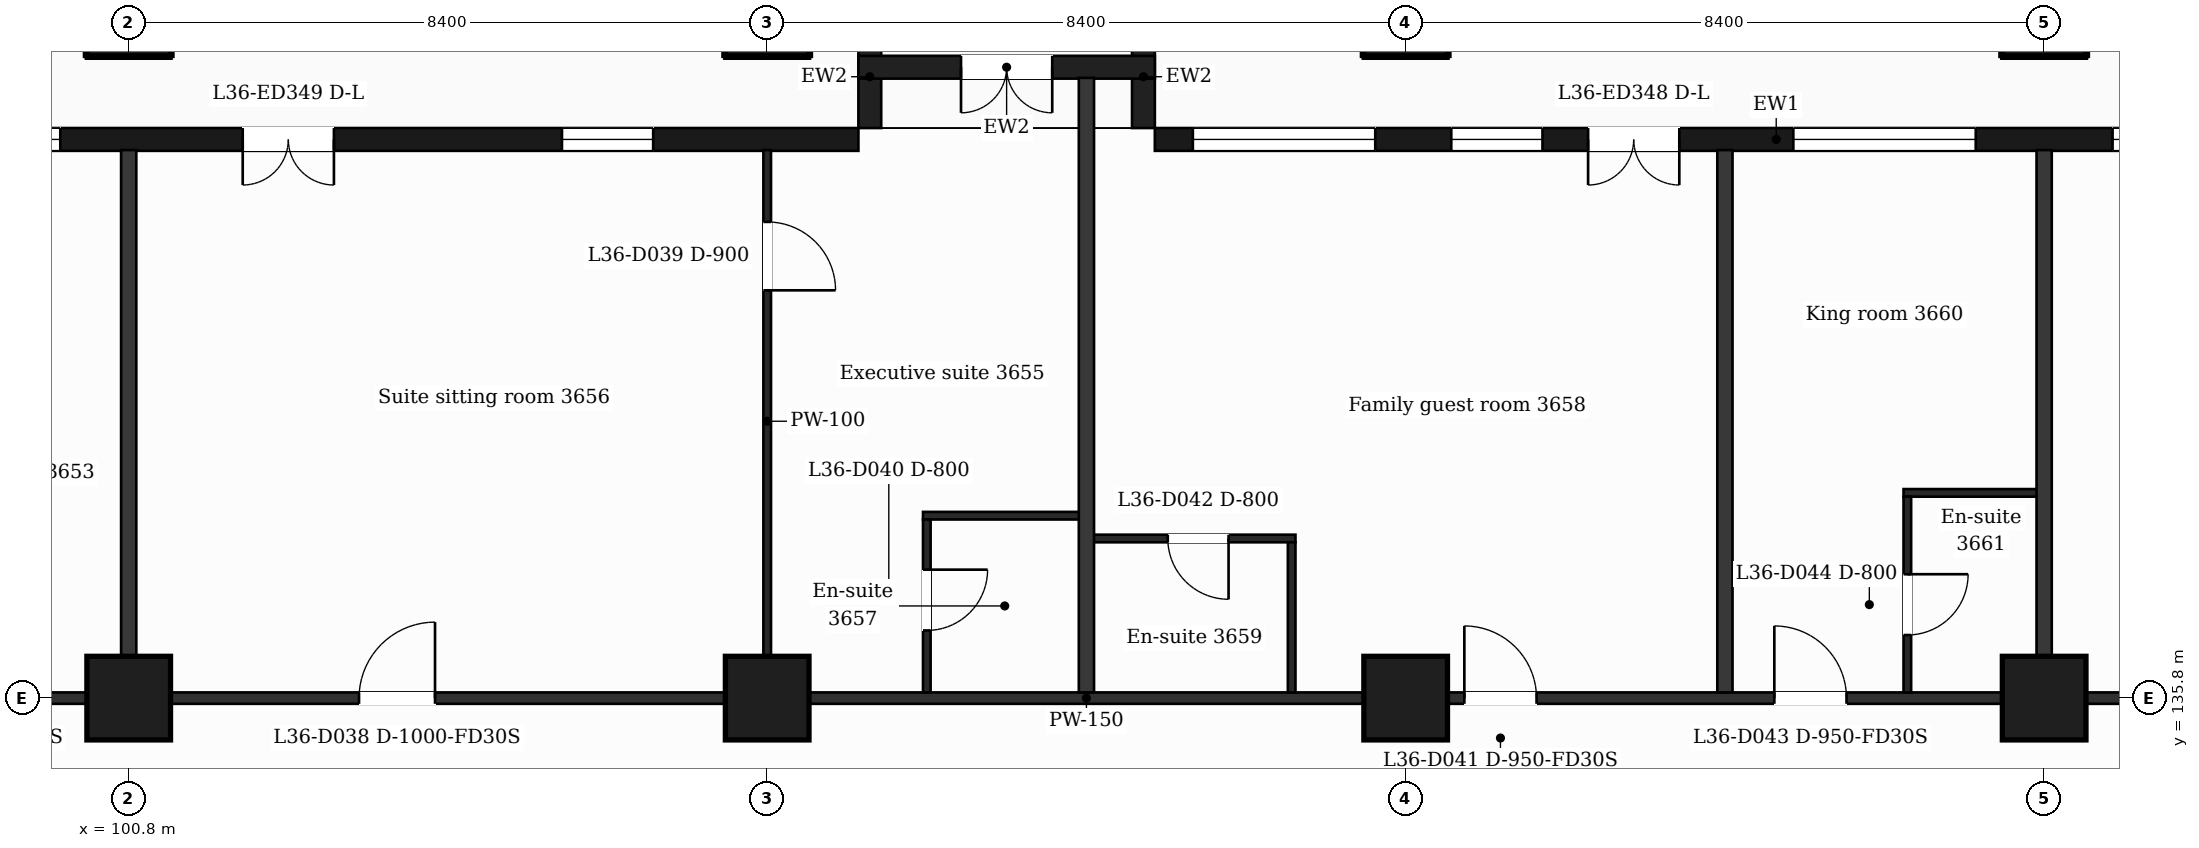
"""IFC4 building model, lengths in metres.
Left out: names, types, materials, properties, quantities, classifications, styles, units other than length and angle.
Written with IfcOpenShell. Run it as: python <this file> out.ifc"""

import sys

from ifc_helpers import new_model, si_unit, direction, frame, frame_2d, origin, origin_2d, place, context, subcontext, project, spatial, rectangle, extrude, element, fill, save


model = new_model("IFC4")
c1 = context("Model", 3, precision=1e-05, world=origin(), true_north=direction((0.0, 1.0)))
c2 = subcontext(c1, "Body", "Model", "MODEL_VIEW")
j1 = project(units=[si_unit("LENGTHUNIT", "METRE"), si_unit("PLANEANGLEUNIT", "RADIAN")], contexts=[c1])
p1 = place(None, origin())
s1 = spatial("IfcSite", under=j1, at=p1, CompositionType="ELEMENT")
p2 = place(p1, origin())
s2 = spatial("IfcBuilding", under=s1, at=p2, CompositionType="ELEMENT")
p3 = place(p2, frame((0.0, 0.0, 155.2)))
s3 = spatial("IfcBuildingStorey", under=s2, at=p3, CompositionType="ELEMENT", Elevation=155.2)
for number, where, z_axis, x_axis in (
    (1, (100.8, 135.8, 0.0), (0.0, 0.0, 1.0), (1.0, 0.0, 0.0)),
    (2, (109.2, 135.8, 0.0), (0.0, 0.0, 1.0), (1.0, 0.0, 0.0)),
    (3, (117.6, 135.8, 0.0), (0.0, 0.0, 1.0), (1.0, 0.0, 0.0)),
    (4, (126.0, 135.8, 0.0), (0.0, 0.0, 1.0), (1.0, 0.0, 0.0)),
    (5, (100.8, 144.8, 0.0), (0.0, 0.0, 1.0), (1.0, 0.0, 0.0)),
    (6, (109.2, 144.8, 0.0), (0.0, 0.0, 1.0), (1.0, 0.0, 0.0)),
    (7, (117.6, 144.8, 0.0), (0.0, 0.0, 1.0), (1.0, 0.0, 0.0)),
    (8, (126.0, 144.8, 0.0), (0.0, 0.0, 1.0), (1.0, 0.0, 0.0)),
):
    element("IfcColumn", number, at=place(p3, frame(where, z_axis=z_axis, x_axis=x_axis)), inside=s3, PredefinedType="COLUMN", context=c2, shape_type="SweptSolid", body=[
        extrude(rectangle(XDim=1.1, YDim=1.1, at=origin_2d()), origin(), (0.0, 0.0, 1.0), 3.7),
    ])
p4 = place(p3, frame((130.65, 143.15, 0.0), z_axis=(0.0, 0.0, 1.0), x_axis=(-1.0, 0.0, 0.0)))
e9 = element("IfcWall", 9, at=p4, inside=s3, PredefinedType="SOLIDWALL", context=c2, shape_type="SweptSolid", body=[
    extrude(rectangle(XDim=16.35, YDim=0.3, at=frame_2d((8.175, 0.0))), origin(), (0.0, 0.0, 1.0), 3.38),
])
p5 = place(p4, frame((1.35, 0.0, 0.9)))
e10 = element("IfcOpeningElement", 10, at=p5, cuts=e9, PredefinedType="OPENING", context=c2, shape_type="SweptSolid", body=[
    extrude(rectangle(XDim=2.4, YDim=2.1, at=frame_2d((1.2, 1.05))), frame((0.0, 0.16, 0.0), z_axis=(0.0, -1.0, 0.0), x_axis=(1.0, 0.0, 0.0)), (0.0, 0.0, 1.0), 0.32),
])
p6 = place(p4, frame((5.55, 0.0, 0.9)))
e11 = element("IfcOpeningElement", 11, at=p6, cuts=e9, PredefinedType="OPENING", context=c2, shape_type="SweptSolid", body=[
    extrude(rectangle(XDim=2.4, YDim=2.1, at=frame_2d((1.2, 1.05))), frame((0.0, 0.16, 0.0), z_axis=(0.0, -1.0, 0.0), x_axis=(1.0, 0.0, 0.0)), (0.0, 0.0, 1.0), 0.32),
])
p7 = place(p4, frame((9.45, 0.0, 0.0)))
e12 = element("IfcOpeningElement", 12, at=p7, cuts=e9, PredefinedType="OPENING", context=c2, shape_type="SweptSolid", body=[
    extrude(rectangle(XDim=1.2, YDim=2.4, at=frame_2d((0.6, 1.2))), frame((0.0, 0.16, 0.0), z_axis=(0.0, -1.0, 0.0), x_axis=(1.0, 0.0, 0.0)), (0.0, 0.0, 1.0), 0.32),
])
p8 = place(p4, frame((11.25, 0.0, 0.9)))
e13 = element("IfcOpeningElement", 13, at=p8, cuts=e9, PredefinedType="OPENING", context=c2, shape_type="SweptSolid", body=[
    extrude(rectangle(XDim=1.2, YDim=2.1, at=frame_2d((0.6, 1.05))), frame((0.0, 0.16, 0.0), z_axis=(0.0, -1.0, 0.0), x_axis=(1.0, 0.0, 0.0)), (0.0, 0.0, 1.0), 0.32),
])
p9 = place(p4, frame((13.45, 0.0, 0.9)))
e14 = element("IfcOpeningElement", 14, at=p9, cuts=e9, PredefinedType="OPENING", context=c2, shape_type="SweptSolid", body=[
    extrude(rectangle(XDim=2.4, YDim=2.1, at=frame_2d((1.2, 1.05))), frame((0.0, 0.16, 0.0), z_axis=(0.0, -1.0, 0.0), x_axis=(1.0, 0.0, 0.0)), (0.0, 0.0, 1.0), 0.32),
])
p10 = place(p3, frame((110.4, 143.15, 0.0), z_axis=(0.0, 0.0, 1.0), x_axis=(-1.0, 0.0, 0.0)))
e15 = element("IfcWall", 15, at=p10, inside=s3, PredefinedType="SOLIDWALL", context=c2, shape_type="SweptSolid", body=[
    extrude(rectangle(XDim=14.4, YDim=0.3, at=frame_2d((7.2, 0.0))), origin(), (0.0, 0.0, 1.0), 3.38),
])
p11 = place(p10, frame((2.7, 0.0, 0.9)))
e16 = element("IfcOpeningElement", 16, at=p11, cuts=e15, PredefinedType="OPENING", context=c2, shape_type="SweptSolid", body=[
    extrude(rectangle(XDim=1.2, YDim=2.1, at=frame_2d((0.6, 1.05))), frame((0.0, 0.16, 0.0), z_axis=(0.0, -1.0, 0.0), x_axis=(1.0, 0.0, 0.0)), (0.0, 0.0, 1.0), 0.32),
])
p12 = place(p10, frame((6.9, 0.0, 0.0)))
e17 = element("IfcOpeningElement", 17, at=p12, cuts=e15, PredefinedType="OPENING", context=c2, shape_type="SweptSolid", body=[
    extrude(rectangle(XDim=1.2, YDim=2.4, at=frame_2d((0.6, 1.2))), frame((0.0, 0.16, 0.0), z_axis=(0.0, -1.0, 0.0), x_axis=(1.0, 0.0, 0.0)), (0.0, 0.0, 1.0), 0.32),
])
p13 = place(p10, frame((10.5, 0.0, 0.9)))
e18 = element("IfcOpeningElement", 18, at=p13, cuts=e15, PredefinedType="OPENING", context=c2, shape_type="SweptSolid", body=[
    extrude(rectangle(XDim=2.4, YDim=2.1, at=frame_2d((1.2, 1.05))), frame((0.0, 0.16, 0.0), z_axis=(0.0, -1.0, 0.0), x_axis=(1.0, 0.0, 0.0)), (0.0, 0.0, 1.0), 0.32),
])
for number, where, z_axis, x_axis in (
    (19, (114.15, 143.3, 0.0), (0.0, 0.0, 1.0), (0.0, 1.0, 0.0)),
    (20, (110.55, 143.3, 0.0), (0.0, 0.0, 1.0), (0.0, 1.0, 0.0)),
):
    element("IfcWall", number, at=place(p3, frame(where, z_axis=z_axis, x_axis=x_axis)), inside=s3, PredefinedType="SOLIDWALL", context=c2, shape_type="SweptSolid", body=[
        extrude(rectangle(XDim=1.35, YDim=0.3, at=frame_2d((0.675, 0.0))), origin(), (0.0, 0.0, 1.0), 3.38),
    ])
p14 = place(p3, frame((114.3, 144.1, 0.0), z_axis=(0.0, 0.0, 1.0), x_axis=(-1.0, 0.0, 0.0)))
e21 = element("IfcWall", 21, at=p14, inside=s3, PredefinedType="SOLIDWALL", context=c2, shape_type="SweptSolid", body=[
    extrude(rectangle(XDim=3.9, YDim=0.3, at=frame_2d((1.95, 0.0))), origin(), (0.0, 0.0, 1.0), 3.38),
])
p15 = place(p14, frame((1.35, 0.0, 0.0)))
e22 = element("IfcOpeningElement", 22, at=p15, cuts=e21, PredefinedType="OPENING", context=c2, shape_type="SweptSolid", body=[
    extrude(rectangle(XDim=1.2, YDim=2.4, at=frame_2d((0.6, 1.2))), frame((0.0, 0.16, 0.0), z_axis=(0.0, -1.0, 0.0), x_axis=(1.0, 0.0, 0.0)), (0.0, 0.0, 1.0), 0.32),
])
p16 = place(p3, frame((90.895, 135.8, 0.0), z_axis=(0.0, 0.0, 1.0), x_axis=(1.0, 0.0, 0.0)))
e23 = element("IfcWall", 23, at=p16, inside=s3, PredefinedType="PARTITIONING", context=c2, shape_type="SweptSolid", body=[
    extrude(rectangle(XDim=45.011, YDim=0.15, at=frame_2d((22.505, 0.0))), origin(), (0.0, 0.0, 1.0), 3.38),
])
p17 = place(p16, frame((6.906, 0.0, 0.0)))
e24 = element("IfcOpeningElement", 24, at=p17, cuts=e23, PredefinedType="OPENING", context=c2, shape_type="SweptSolid", body=[
    extrude(rectangle(XDim=1.0, YDim=2.1, at=frame_2d((0.5, 1.05))), frame((0.0, 0.085, 0.0), z_axis=(0.0, -1.0, 0.0), x_axis=(1.0, 0.0, 0.0)), (0.0, 0.0, 1.0), 0.17),
])
p18 = place(p16, frame((12.935, 0.0, 0.0)))
e25 = element("IfcOpeningElement", 25, at=p18, cuts=e23, PredefinedType="OPENING", context=c2, shape_type="SweptSolid", body=[
    extrude(rectangle(XDim=1.0, YDim=2.1, at=frame_2d((0.5, 1.05))), frame((0.0, 0.085, 0.0), z_axis=(0.0, -1.0, 0.0), x_axis=(1.0, 0.0, 0.0)), (0.0, 0.0, 1.0), 0.17),
])
p19 = place(p16, frame((27.477, 0.0, 0.0)))
e26 = element("IfcOpeningElement", 26, at=p19, cuts=e23, PredefinedType="OPENING", context=c2, shape_type="SweptSolid", body=[
    extrude(rectangle(XDim=0.95, YDim=2.1, at=frame_2d((0.475, 1.05))), frame((0.0, 0.085, 0.0), z_axis=(0.0, -1.0, 0.0), x_axis=(1.0, 0.0, 0.0)), (0.0, 0.0, 1.0), 0.17),
])
p20 = place(p16, frame((31.555, 0.0, 0.0)))
e27 = element("IfcOpeningElement", 27, at=p20, cuts=e23, PredefinedType="OPENING", context=c2, shape_type="SweptSolid", body=[
    extrude(rectangle(XDim=0.95, YDim=2.1, at=frame_2d((0.475, 1.05))), frame((0.0, 0.085, 0.0), z_axis=(0.0, -1.0, 0.0), x_axis=(1.0, 0.0, 0.0)), (0.0, 0.0, 1.0), 0.17),
])
p21 = place(p16, frame((39.814, 0.0, 0.0)))
e28 = element("IfcOpeningElement", 28, at=p21, cuts=e23, PredefinedType="OPENING", context=c2, shape_type="SweptSolid", body=[
    extrude(rectangle(XDim=0.95, YDim=2.1, at=frame_2d((0.475, 1.05))), frame((0.0, 0.085, 0.0), z_axis=(0.0, -1.0, 0.0), x_axis=(1.0, 0.0, 0.0)), (0.0, 0.0, 1.0), 0.17),
])
p22 = place(p3, frame((113.4, 137.9, 0.0), z_axis=(0.0, 0.0, 1.0), x_axis=(1.0, 0.0, 0.0)))
e29 = element("IfcWall", 29, at=p22, inside=s3, PredefinedType="PARTITIONING", context=c2, shape_type="SweptSolid", body=[
    extrude(rectangle(XDim=2.75, YDim=0.1, at=frame_2d((1.375, 0.0))), origin(), (0.0, 0.0, 1.0), 3.38),
])
p23 = place(p22, frame((1.07, 0.0, 0.0)))
e30 = element("IfcOpeningElement", 30, at=p23, cuts=e29, PredefinedType="OPENING", context=c2, shape_type="SweptSolid", body=[
    extrude(rectangle(XDim=0.8, YDim=2.1, at=frame_2d((0.4, 1.05))), frame((0.0, 0.06, 0.0), z_axis=(0.0, -1.0, 0.0), x_axis=(1.0, 0.0, 0.0)), (0.0, 0.0, 1.0), 0.12),
])
p24 = place(p3, frame((111.25, 138.2, 0.0), z_axis=(0.0, 0.0, 1.0), x_axis=(1.0, 0.0, 0.0)))
e31 = element("IfcWall", 31, at=p24, inside=s3, PredefinedType="PARTITIONING", context=c2, shape_type="SweptSolid", body=[
    extrude(rectangle(XDim=2.15, YDim=0.1, at=frame_2d((1.075, 0.0))), origin(), (0.0, 0.0, 1.0), 3.38),
])
p25 = place(p3, frame((124.15, 138.5, 0.0), z_axis=(0.0, 0.0, 1.0), x_axis=(1.0, 0.0, 0.0)))
e32 = element("IfcWall", 32, at=p25, inside=s3, PredefinedType="PARTITIONING", context=c2, shape_type="SweptSolid", body=[
    extrude(rectangle(XDim=1.85, YDim=0.1, at=frame_2d((0.925, 0.0))), origin(), (0.0, 0.0, 1.0), 3.38),
])
p26 = place(p3, frame((100.8, 135.875, 0.0), z_axis=(0.0, 0.0, 1.0), x_axis=(0.0, 1.0, 0.0)))
e33 = element("IfcWall", 33, at=p26, inside=s3, PredefinedType="PARTITIONING", context=c2, shape_type="SweptSolid", body=[
    extrude(rectangle(XDim=7.135, YDim=0.2, at=frame_2d((3.567, 0.0))), origin(), (0.0, 0.0, 1.0), 3.38),
])
p27 = place(p3, frame((109.2, 135.875, 0.0), z_axis=(0.0, 0.0, 1.0), x_axis=(0.0, 1.0, 0.0)))
e34 = element("IfcWall", 34, at=p27, inside=s3, PredefinedType="PARTITIONING", context=c2, shape_type="SweptSolid", body=[
    extrude(rectangle(XDim=7.135, YDim=0.1, at=frame_2d((3.567, 0.0))), origin(), (0.0, 0.0, 1.0), 3.38),
])
p28 = place(p27, frame((5.29, 0.0, 0.0)))
e35 = element("IfcOpeningElement", 35, at=p28, cuts=e34, PredefinedType="OPENING", context=c2, shape_type="SweptSolid", body=[
    extrude(rectangle(XDim=0.9, YDim=2.1, at=frame_2d((0.45, 1.05))), frame((0.0, 0.06, 0.0), z_axis=(0.0, -1.0, 0.0), x_axis=(1.0, 0.0, 0.0)), (0.0, 0.0, 1.0), 0.12),
])
p29 = place(p3, frame((111.3, 135.875, 0.0), z_axis=(0.0, 0.0, 1.0), x_axis=(0.0, 1.0, 0.0)))
e36 = element("IfcWall", 36, at=p29, inside=s3, PredefinedType="PARTITIONING", context=c2, shape_type="SweptSolid", body=[
    extrude(rectangle(XDim=2.275, YDim=0.1, at=frame_2d((1.137, 0.0))), origin(), (0.0, 0.0, 1.0), 3.38),
])
p30 = place(p29, frame((0.815, 0.0, 0.0)))
e37 = element("IfcOpeningElement", 37, at=p30, cuts=e36, PredefinedType="OPENING", context=c2, shape_type="SweptSolid", body=[
    extrude(rectangle(XDim=0.8, YDim=2.1, at=frame_2d((0.4, 1.05))), frame((0.0, 0.06, 0.0), z_axis=(0.0, -1.0, 0.0), x_axis=(1.0, 0.0, 0.0)), (0.0, 0.0, 1.0), 0.12),
])
p31 = place(p3, frame((113.4, 135.875, 0.0), z_axis=(0.0, 0.0, 1.0), x_axis=(0.0, 1.0, 0.0)))
e38 = element("IfcWall", 38, at=p31, inside=s3, PredefinedType="PARTITIONING", context=c2, shape_type="SweptSolid", body=[
    extrude(rectangle(XDim=8.085, YDim=0.2, at=frame_2d((4.042, 0.0))), origin(), (0.0, 0.0, 1.0), 3.38),
])
p32 = place(p3, frame((116.1, 135.875, 0.0), z_axis=(0.0, 0.0, 1.0), x_axis=(0.0, 1.0, 0.0)))
e39 = element("IfcWall", 39, at=p32, inside=s3, PredefinedType="PARTITIONING", context=c2, shape_type="SweptSolid", body=[
    extrude(rectangle(XDim=1.975, YDim=0.1, at=frame_2d((0.988, 0.0))), origin(), (0.0, 0.0, 1.0), 3.38),
])
p33 = place(p3, frame((121.8, 135.875, 0.0), z_axis=(0.0, 0.0, 1.0), x_axis=(0.0, 1.0, 0.0)))
e40 = element("IfcWall", 40, at=p33, inside=s3, PredefinedType="PARTITIONING", context=c2, shape_type="SweptSolid", body=[
    extrude(rectangle(XDim=7.135, YDim=0.2, at=frame_2d((3.567, 0.0))), origin(), (0.0, 0.0, 1.0), 3.38),
])
p34 = place(p3, frame((124.2, 135.875, 0.0), z_axis=(0.0, 0.0, 1.0), x_axis=(0.0, 1.0, 0.0)))
e41 = element("IfcWall", 41, at=p34, inside=s3, PredefinedType="PARTITIONING", context=c2, shape_type="SweptSolid", body=[
    extrude(rectangle(XDim=2.575, YDim=0.1, at=frame_2d((1.288, 0.0))), origin(), (0.0, 0.0, 1.0), 3.38),
])
p35 = place(p34, frame((0.755, 0.0, 0.0)))
e42 = element("IfcOpeningElement", 42, at=p35, cuts=e41, PredefinedType="OPENING", context=c2, shape_type="SweptSolid", body=[
    extrude(rectangle(XDim=0.8, YDim=2.1, at=frame_2d((0.4, 1.05))), frame((0.0, 0.06, 0.0), z_axis=(0.0, -1.0, 0.0), x_axis=(1.0, 0.0, 0.0)), (0.0, 0.0, 1.0), 0.12),
])
p36 = place(p3, frame((126.0, 135.875, 0.0), z_axis=(0.0, 0.0, 1.0), x_axis=(0.0, 1.0, 0.0)))
e43 = element("IfcWall", 43, at=p36, inside=s3, PredefinedType="PARTITIONING", context=c2, shape_type="SweptSolid", body=[
    extrude(rectangle(XDim=7.135, YDim=0.2, at=frame_2d((3.567, 0.0))), origin(), (0.0, 0.0, 1.0), 3.38),
])
p37 = place(p5, origin())
e44 = element("IfcWindow", 44, at=p37, inside=s3, PartitioningType="SINGLE_PANEL", PredefinedType="WINDOW", context=c2, shape_type="SweptSolid", body=[
    extrude(rectangle(XDim=2.4, YDim=2.1, at=frame_2d((1.2, 1.05))), frame((0.0, 0.03, 0.0), z_axis=(0.0, -1.0, 0.0), x_axis=(1.0, 0.0, 0.0)), (0.0, 0.0, 1.0), 0.06),
])
fill(e10, e44)
p38 = place(p6, origin())
e45 = element("IfcWindow", 45, at=p38, inside=s3, PartitioningType="SINGLE_PANEL", PredefinedType="WINDOW", context=c2, shape_type="SweptSolid", body=[
    extrude(rectangle(XDim=2.4, YDim=2.1, at=frame_2d((1.2, 1.05))), frame((0.0, 0.03, 0.0), z_axis=(0.0, -1.0, 0.0), x_axis=(1.0, 0.0, 0.0)), (0.0, 0.0, 1.0), 0.06),
])
fill(e11, e45)
p39 = place(p7, origin())
e46 = element("IfcDoor", 46, at=p39, inside=s3, OperationType="DOUBLE_DOOR_SINGLE_SWING", PredefinedType="DOOR", context=c2, shape_type="SweptSolid", body=[
    extrude(rectangle(XDim=1.2, YDim=2.4, at=frame_2d((0.6, 1.2))), frame((0.0, 0.025, 0.0), z_axis=(0.0, -1.0, 0.0), x_axis=(1.0, 0.0, 0.0)), (0.0, 0.0, 1.0), 0.05),
])
fill(e12, e46)
p40 = place(p8, origin())
e47 = element("IfcWindow", 47, at=p40, inside=s3, PartitioningType="SINGLE_PANEL", PredefinedType="WINDOW", context=c2, shape_type="SweptSolid", body=[
    extrude(rectangle(XDim=1.2, YDim=2.1, at=frame_2d((0.6, 1.05))), frame((0.0, 0.03, 0.0), z_axis=(0.0, -1.0, 0.0), x_axis=(1.0, 0.0, 0.0)), (0.0, 0.0, 1.0), 0.06),
])
fill(e13, e47)
p41 = place(p9, origin())
e48 = element("IfcWindow", 48, at=p41, inside=s3, PartitioningType="SINGLE_PANEL", PredefinedType="WINDOW", context=c2, shape_type="SweptSolid", body=[
    extrude(rectangle(XDim=2.4, YDim=2.1, at=frame_2d((1.2, 1.05))), frame((0.0, 0.03, 0.0), z_axis=(0.0, -1.0, 0.0), x_axis=(1.0, 0.0, 0.0)), (0.0, 0.0, 1.0), 0.06),
])
fill(e14, e48)
p42 = place(p11, origin())
e49 = element("IfcWindow", 49, at=p42, inside=s3, PartitioningType="SINGLE_PANEL", PredefinedType="WINDOW", context=c2, shape_type="SweptSolid", body=[
    extrude(rectangle(XDim=1.2, YDim=2.1, at=frame_2d((0.6, 1.05))), frame((0.0, 0.03, 0.0), z_axis=(0.0, -1.0, 0.0), x_axis=(1.0, 0.0, 0.0)), (0.0, 0.0, 1.0), 0.06),
])
fill(e16, e49)
p43 = place(p12, origin())
e50 = element("IfcDoor", 50, at=p43, inside=s3, OperationType="DOUBLE_DOOR_SINGLE_SWING", PredefinedType="DOOR", context=c2, shape_type="SweptSolid", body=[
    extrude(rectangle(XDim=1.2, YDim=2.4, at=frame_2d((0.6, 1.2))), frame((0.0, 0.025, 0.0), z_axis=(0.0, -1.0, 0.0), x_axis=(1.0, 0.0, 0.0)), (0.0, 0.0, 1.0), 0.05),
])
fill(e17, e50)
p44 = place(p13, origin())
e51 = element("IfcWindow", 51, at=p44, inside=s3, PartitioningType="SINGLE_PANEL", PredefinedType="WINDOW", context=c2, shape_type="SweptSolid", body=[
    extrude(rectangle(XDim=2.4, YDim=2.1, at=frame_2d((1.2, 1.05))), frame((0.0, 0.03, 0.0), z_axis=(0.0, -1.0, 0.0), x_axis=(1.0, 0.0, 0.0)), (0.0, 0.0, 1.0), 0.06),
])
fill(e18, e51)
p45 = place(p15, origin())
e52 = element("IfcDoor", 52, at=p45, inside=s3, OperationType="DOUBLE_DOOR_SINGLE_SWING", PredefinedType="DOOR", context=c2, shape_type="SweptSolid", body=[
    extrude(rectangle(XDim=1.2, YDim=2.4, at=frame_2d((0.6, 1.2))), frame((0.0, 0.025, 0.0), z_axis=(0.0, -1.0, 0.0), x_axis=(1.0, 0.0, 0.0)), (0.0, 0.0, 1.0), 0.05),
])
fill(e22, e52)
p46 = place(p18, origin())
e53 = element("IfcDoor", 53, at=p46, inside=s3, OperationType="SINGLE_SWING_RIGHT", PredefinedType="DOOR", context=c2, shape_type="SweptSolid", body=[
    extrude(rectangle(XDim=1.0, YDim=2.1, at=frame_2d((0.5, 1.05))), frame((0.0, 0.025, 0.0), z_axis=(0.0, -1.0, 0.0), x_axis=(1.0, 0.0, 0.0)), (0.0, 0.0, 1.0), 0.05),
])
fill(e25, e53)
p47 = place(p28, origin())
e54 = element("IfcDoor", 54, at=p47, inside=s3, OperationType="SINGLE_SWING_LEFT", PredefinedType="DOOR", context=c2, shape_type="SweptSolid", body=[
    extrude(rectangle(XDim=0.9, YDim=2.1, at=frame_2d((0.45, 1.05))), frame((0.0, 0.025, 0.0), z_axis=(0.0, -1.0, 0.0), x_axis=(1.0, 0.0, 0.0)), (0.0, 0.0, 1.0), 0.05),
])
fill(e35, e54)
p48 = place(p30, origin())
e55 = element("IfcDoor", 55, at=p48, inside=s3, OperationType="SINGLE_SWING_RIGHT", PredefinedType="DOOR", context=c2, shape_type="SweptSolid", body=[
    extrude(rectangle(XDim=0.8, YDim=2.1, at=frame_2d((0.4, 1.05))), frame((0.0, 0.025, 0.0), z_axis=(0.0, -1.0, 0.0), x_axis=(1.0, 0.0, 0.0)), (0.0, 0.0, 1.0), 0.05),
])
fill(e37, e55)
p49 = place(p19, origin())
e56 = element("IfcDoor", 56, at=p49, inside=s3, OperationType="SINGLE_SWING_LEFT", PredefinedType="DOOR", context=c2, shape_type="SweptSolid", body=[
    extrude(rectangle(XDim=0.95, YDim=2.1, at=frame_2d((0.475, 1.05))), frame((0.0, 0.025, 0.0), z_axis=(0.0, -1.0, 0.0), x_axis=(1.0, 0.0, 0.0)), (0.0, 0.0, 1.0), 0.05),
])
fill(e26, e56)
p50 = place(p23, origin())
e57 = element("IfcDoor", 57, at=p50, inside=s3, OperationType="SINGLE_SWING_RIGHT", PredefinedType="DOOR", context=c2, shape_type="SweptSolid", body=[
    extrude(rectangle(XDim=0.8, YDim=2.1, at=frame_2d((0.4, 1.05))), frame((0.0, 0.025, 0.0), z_axis=(0.0, -1.0, 0.0), x_axis=(1.0, 0.0, 0.0)), (0.0, 0.0, 1.0), 0.05),
])
fill(e30, e57)
p51 = place(p20, origin())
e58 = element("IfcDoor", 58, at=p51, inside=s3, OperationType="SINGLE_SWING_LEFT", PredefinedType="DOOR", context=c2, shape_type="SweptSolid", body=[
    extrude(rectangle(XDim=0.95, YDim=2.1, at=frame_2d((0.475, 1.05))), frame((0.0, 0.025, 0.0), z_axis=(0.0, -1.0, 0.0), x_axis=(1.0, 0.0, 0.0)), (0.0, 0.0, 1.0), 0.05),
])
fill(e27, e58)
p52 = place(p35, origin())
e59 = element("IfcDoor", 59, at=p52, inside=s3, OperationType="SINGLE_SWING_RIGHT", PredefinedType="DOOR", context=c2, shape_type="SweptSolid", body=[
    extrude(rectangle(XDim=0.8, YDim=2.1, at=frame_2d((0.4, 1.05))), frame((0.0, 0.025, 0.0), z_axis=(0.0, -1.0, 0.0), x_axis=(1.0, 0.0, 0.0)), (0.0, 0.0, 1.0), 0.05),
])
fill(e42, e59)
save(model, sys.argv[1])
